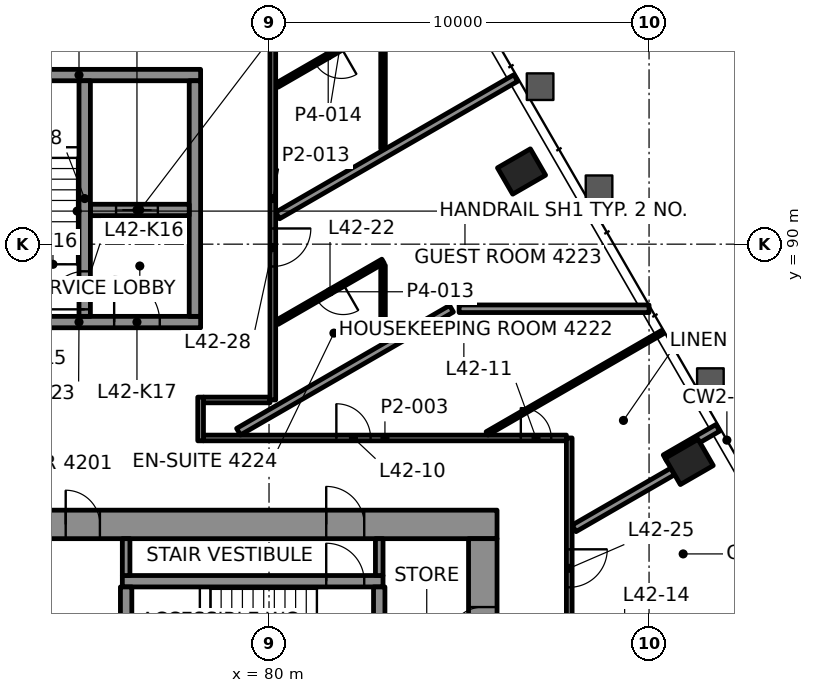
"""IFC4 building model, lengths in metres.
Left out: names, types, materials, properties, quantities, classifications, styles, units other than length and angle.
Written with IfcOpenShell. Run it as: python <this file> out.ifc"""

import sys

from ifc_helpers import new_model, si_unit, direction, frame, frame_2d, origin, origin_2d, place, context, subcontext, project, spatial, rectangle, hollow_rectangle, extrude, element, fill, save


model = new_model("IFC4")
c1 = context("Model", 3, precision=1e-05, world=origin(), true_north=direction((0.0, 1.0)))
c2 = subcontext(c1, "Body", "Model", "MODEL_VIEW")
j1 = project(units=[si_unit("LENGTHUNIT", "METRE"), si_unit("PLANEANGLEUNIT", "RADIAN")], contexts=[c1])
p1 = place(None, origin())
s1 = spatial("IfcSite", under=j1, at=p1, CompositionType="ELEMENT")
p2 = place(p1, origin())
s2 = spatial("IfcBuilding", under=s1, at=p2, CompositionType="ELEMENT")
p3 = place(p2, frame((0.0, 0.0, 183.1)))
s3 = spatial("IfcBuildingStorey", under=s2, at=p3, CompositionType="ELEMENT", Elevation=183.1)
for number, where, z_axis, x_axis in (
    (1, (91.056, 84.27, -0.0), (0.0, 0.0, 1.0), (-0.5, 0.866, 0.0)),
    (2, (86.645, 91.912, -0.0), (0.0, 0.0, 1.0), (-0.5, 0.866, 0.0)),
):
    element("IfcColumn", number, at=place(p3, frame(where, z_axis=z_axis, x_axis=x_axis)), inside=s3, PredefinedType="COLUMN", context=c2, shape_type="SweptSolid", body=[
        extrude(hollow_rectangle(XDim=0.8, YDim=1.0, WallThickness=0.05, at=origin_2d()), origin(), (0.0, 0.0, 1.0), 3.9),
    ])
p4 = place(p3, frame((64.0, 82.625, 0.0), z_axis=(0.0, 0.0, 1.0), x_axis=(1.0, 0.0, 0.0)))
e3 = element("IfcWall", 3, at=p4, inside=s3, PredefinedType="SHEAR", context=c2, shape_type="SweptSolid", body=[
    extrude(rectangle(XDim=22.0, YDim=0.75, at=frame_2d((11.0, 0.0))), origin(), (0.0, 0.0, 1.0), 3.7),
])
p5 = place(p4, frame((3.695, 0.0, 0.0)))
e4 = element("IfcOpeningElement", 4, at=p5, cuts=e3, PredefinedType="OPENING", context=c2, shape_type="SweptSolid", body=[
    extrude(rectangle(XDim=1.0, YDim=2.1, at=frame_2d((0.5, 1.05))), frame((0.0, 0.385, 0.0), z_axis=(0.0, -1.0, 0.0), x_axis=(1.0, 0.0, 0.0)), (0.0, 0.0, 1.0), 0.77),
])
p6 = place(p4, frame((17.505, 0.0, 0.0)))
e5 = element("IfcOpeningElement", 5, at=p6, cuts=e3, PredefinedType="OPENING", context=c2, shape_type="SweptSolid", body=[
    extrude(rectangle(XDim=1.0, YDim=2.1, at=frame_2d((0.5, 1.05))), frame((0.0, 0.385, 0.0), z_axis=(0.0, -1.0, 0.0), x_axis=(1.0, 0.0, 0.0)), (0.0, 0.0, 1.0), 0.77),
])
p7 = place(p4, frame((10.65, 0.0, 0.0)))
e6 = element("IfcOpeningElement", 6, at=p7, cuts=e3, PredefinedType="OPENING", context=c2, shape_type="SweptSolid", body=[
    extrude(rectangle(XDim=0.9, YDim=2.1, at=frame_2d((0.45, 1.05))), frame((0.0, 0.385, 0.0), z_axis=(0.0, -1.0, 0.0), x_axis=(1.0, 0.0, 0.0)), (0.0, 0.0, 1.0), 0.77),
])
p8 = place(p3, frame((85.625, 67.75, 0.0), z_axis=(0.0, 0.0, 1.0), x_axis=(0.0, 1.0, 0.0)))
e7 = element("IfcWall", 7, at=p8, inside=s3, PredefinedType="SHEAR", context=c2, shape_type="SweptSolid", body=[
    extrude(rectangle(XDim=14.5, YDim=0.75, at=frame_2d((7.25, 0.0))), origin(), (0.0, 0.0, 1.0), 3.7),
])
p9 = place(p8, frame((4.65, 0.0, 0.0)))
e8 = element("IfcOpeningElement", 8, at=p9, cuts=e7, PredefinedType="OPENING", context=c2, shape_type="SweptSolid", body=[
    extrude(rectangle(XDim=1.8, YDim=2.1, at=frame_2d((0.9, 1.05))), frame((0.0, 0.385, 0.0), z_axis=(0.0, -1.0, 0.0), x_axis=(1.0, 0.0, 0.0)), (0.0, 0.0, 1.0), 0.77),
])
p10 = place(p8, frame((11.8, 0.0, 0.0)))
e9 = element("IfcOpeningElement", 9, at=p10, cuts=e7, PredefinedType="OPENING", context=c2, shape_type="SweptSolid", body=[
    extrude(rectangle(XDim=0.9, YDim=2.1, at=frame_2d((0.45, 1.05))), frame((0.0, 0.385, 0.0), z_axis=(0.0, -1.0, 0.0), x_axis=(1.0, 0.0, 0.0)), (0.0, 0.0, 1.0), 0.77),
])
p11 = place(p3, frame((76.14, 81.13, 0.0), z_axis=(0.0, 0.0, 1.0), x_axis=(1.0, 0.0, 0.0)))
e10 = element("IfcWall", 10, at=p11, inside=s3, PredefinedType="SHEAR", context=c2, shape_type="SweptSolid", body=[
    extrude(rectangle(XDim=6.86, YDim=0.3, at=frame_2d((3.43, 0.0))), origin(), (0.0, 0.0, 1.0), 3.7),
])
p12 = place(p11, frame((5.365, 0.0, 0.0)))
e11 = element("IfcOpeningElement", 11, at=p12, cuts=e10, PredefinedType="OPENING", context=c2, shape_type="SweptSolid", body=[
    extrude(rectangle(XDim=1.0, YDim=2.1, at=frame_2d((0.5, 1.05))), frame((0.0, 0.16, 0.0), z_axis=(0.0, -1.0, 0.0), x_axis=(1.0, 0.0, 0.0)), (0.0, 0.0, 1.0), 0.32),
])
for number, where, z_axis, x_axis in (
    (12, (76.24, 77.9, 0.0), (0.0, 0.0, 1.0), (0.0, 1.0, 0.0)),
    (13, (82.9, 77.9, 0.0), (0.0, 0.0, 1.0), (0.0, 1.0, 0.0)),
):
    element("IfcWall", number, at=place(p3, frame(where, z_axis=z_axis, x_axis=x_axis)), inside=s3, PredefinedType="SHEAR", context=c2, shape_type="SweptSolid", body=[
        extrude(rectangle(XDim=3.08, YDim=0.3, at=frame_2d((1.54, 0.0))), origin(), (0.0, 0.0, 1.0), 3.7),
    ])
p13 = place(p3, frame((71.8, 87.95, 0.0), z_axis=(0.0, 0.0, 1.0), x_axis=(1.0, 0.0, 0.0)))
e14 = element("IfcWall", 14, at=p13, inside=s3, PredefinedType="SHEAR", context=c2, shape_type="SweptSolid", body=[
    extrude(rectangle(XDim=6.4, YDim=0.3, at=frame_2d((3.2, 0.0))), origin(), (0.0, 0.0, 1.0), 3.7),
])
p14 = place(p13, frame((1.325, 0.0, 0.0)))
e15 = element("IfcOpeningElement", 15, at=p14, cuts=e14, PredefinedType="OPENING", context=c2, shape_type="SweptSolid", body=[
    extrude(rectangle(XDim=1.0, YDim=2.1, at=frame_2d((0.5, 1.05))), frame((0.0, 0.16, 0.0), z_axis=(0.0, -1.0, 0.0), x_axis=(1.0, 0.0, 0.0)), (0.0, 0.0, 1.0), 0.32),
])
p15 = place(p13, frame((4.125, 0.0, 0.0)))
e16 = element("IfcOpeningElement", 16, at=p15, cuts=e14, PredefinedType="OPENING", context=c2, shape_type="SweptSolid", body=[
    extrude(rectangle(XDim=1.2, YDim=2.1, at=frame_2d((0.6, 1.05))), frame((0.0, 0.16, 0.0), z_axis=(0.0, -1.0, 0.0), x_axis=(1.0, 0.0, 0.0)), (0.0, 0.0, 1.0), 0.32),
])
p16 = place(p3, frame((71.8, 94.45, 0.0), z_axis=(0.0, 0.0, 1.0), x_axis=(1.0, 0.0, 0.0)))
e17 = element("IfcWall", 17, at=p16, inside=s3, PredefinedType="SHEAR", context=c2, shape_type="SweptSolid", body=[
    extrude(rectangle(XDim=6.4, YDim=0.3, at=frame_2d((3.2, 0.0))), origin(), (0.0, 0.0, 1.0), 3.7),
])
p17 = place(p3, frame((78.05, 88.1, 0.0), z_axis=(0.0, 0.0, 1.0), x_axis=(0.0, 1.0, 0.0)))
e18 = element("IfcWall", 18, at=p17, inside=s3, PredefinedType="SHEAR", context=c2, shape_type="SweptSolid", body=[
    extrude(rectangle(XDim=6.2, YDim=0.3, at=frame_2d((3.1, 0.0))), origin(), (0.0, 0.0, 1.0), 3.7),
])
p18 = place(p3, frame((75.3, 90.9, 0.0), z_axis=(0.0, 0.0, 1.0), x_axis=(1.0, 0.0, 0.0)))
e19 = element("IfcWall", 19, at=p18, inside=s3, PredefinedType="SHEAR", context=c2, shape_type="SweptSolid", body=[
    extrude(rectangle(XDim=2.6, YDim=0.3, at=frame_2d((1.3, 0.0))), origin(), (0.0, 0.0, 1.0), 3.7),
])
p19 = place(p18, frame((0.675, 0.0, 0.0)))
e20 = element("IfcOpeningElement", 20, at=p19, cuts=e19, PredefinedType="OPENING", context=c2, shape_type="SweptSolid", body=[
    extrude(rectangle(XDim=1.1, YDim=2.1, at=frame_2d((0.55, 1.05))), frame((0.0, 0.16, 0.0), z_axis=(0.0, -1.0, 0.0), x_axis=(1.0, 0.0, 0.0)), (0.0, 0.0, 1.0), 0.32),
])
p20 = place(p3, frame((75.15, 88.1, 0.0), z_axis=(0.0, 0.0, 1.0), x_axis=(0.0, 1.0, 0.0)))
e21 = element("IfcWall", 21, at=p20, inside=s3, PredefinedType="SHEAR", context=c2, shape_type="SweptSolid", body=[
    extrude(rectangle(XDim=6.2, YDim=0.3, at=frame_2d((3.1, 0.0))), origin(), (0.0, 0.0, 1.0), 3.7),
])
p21 = place(p20, frame((0.185, 0.0, 0.0)))
e22 = element("IfcOpeningElement", 22, at=p21, cuts=e21, PredefinedType="OPENING", context=c2, shape_type="SweptSolid", body=[
    extrude(rectangle(XDim=1.0, YDim=2.1, at=frame_2d((0.5, 1.05))), frame((0.0, 0.16, 0.0), z_axis=(0.0, -1.0, 0.0), x_axis=(1.0, 0.0, 0.0)), (0.0, 0.0, 1.0), 0.32),
])
p22 = place(p3, frame((78.275, 84.9, 0.0), z_axis=(0.0, 0.0, 1.0), x_axis=(1.0, 0.0, 0.0)))
e23 = element("IfcWall", 23, at=p22, inside=s3, PredefinedType="PARTITIONING", context=c2, shape_type="SweptSolid", body=[
    extrude(rectangle(XDim=9.55, YDim=0.15, at=frame_2d((4.775, 0.0))), origin(), (0.0, 0.0, 1.0), 3.1),
])
p23 = place(p22, frame((3.497, 0.0, 0.0)))
e24 = element("IfcOpeningElement", 24, at=p23, cuts=e23, PredefinedType="OPENING", context=c2, shape_type="SweptSolid", body=[
    extrude(rectangle(XDim=0.9, YDim=2.1, at=frame_2d((0.45, 1.05))), frame((0.0, 0.085, 0.0), z_axis=(0.0, -1.0, 0.0), x_axis=(1.0, 0.0, 0.0)), (0.0, 0.0, 1.0), 0.17),
])
p24 = place(p22, frame((8.351, 0.0, 0.0)))
e25 = element("IfcOpeningElement", 25, at=p24, cuts=e23, PredefinedType="OPENING", context=c2, shape_type="SweptSolid", body=[
    extrude(rectangle(XDim=0.8, YDim=2.1, at=frame_2d((0.4, 1.05))), frame((0.0, 0.085, 0.0), z_axis=(0.0, -1.0, 0.0), x_axis=(1.0, 0.0, 0.0)), (0.0, 0.0, 1.0), 0.17),
])
p25 = place(p3, frame((78.275, 85.9, 0.0), z_axis=(0.0, 0.0, 1.0), x_axis=(1.0, 0.0, 0.0)))
e26 = element("IfcWall", 26, at=p25, inside=s3, PredefinedType="PARTITIONING", context=c2, shape_type="SweptSolid", body=[
    extrude(rectangle(XDim=1.75, YDim=0.15, at=frame_2d((0.875, 0.0))), origin(), (0.0, 0.0, 1.0), 3.1),
])
p26 = place(p3, frame((83.06, 87.8, 0.0), z_axis=(0.0, 0.0, 1.0), x_axis=(1.0, 0.0, 0.0)))
e27 = element("IfcWall", 27, at=p26, inside=s3, PredefinedType="PARTITIONING", context=c2, shape_type="SweptSolid", body=[
    extrude(rectangle(XDim=0.564, YDim=0.12, at=frame_2d((0.282, 0.0))), origin(), (0.0, 0.0, 1.0), 3.1),
])
p27 = place(p3, frame((85.002, 88.3, 0.0), z_axis=(0.0, 0.0, 1.0), x_axis=(1.0, 0.0, 0.0)))
e28 = element("IfcWall", 28, at=p27, inside=s3, PredefinedType="PARTITIONING", context=c2, shape_type="SweptSolid", body=[
    extrude(rectangle(XDim=4.998, YDim=0.2, at=frame_2d((2.499, 0.0))), origin(), (0.0, 0.0, 1.0), 3.022),
])
p28 = place(p3, frame((88.027, 82.521, 0.0), z_axis=(0.0, 0.0, 1.0), x_axis=(0.866029639064, 0.499992664208, 0.0)))
e29 = element("IfcWall", 29, at=p28, inside=s3, PredefinedType="PARTITIONING", context=c2, shape_type="SweptSolid", body=[
    extrude(rectangle(XDim=2.998, YDim=0.2, at=frame_2d((1.499, 0.0))), origin(), (0.0, 0.0, 1.0), 3.1),
])
p29 = place(p3, frame((90.423, 84.367, 0.0), z_axis=(0.0, 0.0, 1.0), x_axis=(0.865989903783, 0.500061482766, 0.0)))
e30 = element("IfcWall", 30, at=p29, inside=s3, PredefinedType="PARTITIONING", context=c2, shape_type="SweptSolid", body=[
    extrude(rectangle(XDim=1.6, YDim=0.2, at=frame_2d((0.8, 0.0))), origin(), (0.0, 0.0, 1.0), 3.022),
])
p30 = place(p3, frame((85.737, 85.02, 0.0), z_axis=(0.0, 0.0, 1.0), x_axis=(0.8660338432, 0.499985382219, 0.0)))
e31 = element("IfcWall", 31, at=p30, inside=s3, PredefinedType="PARTITIONING", context=c2, shape_type="SweptSolid", body=[
    extrude(rectangle(XDim=5.332, YDim=0.1, at=frame_2d((2.666, 0.0))), origin(), (0.0, 0.0, 1.0), 3.022),
])
p31 = place(p3, frame((79.197, 85.065, 0.0), z_axis=(0.0, 0.0, 1.0), x_axis=(0.86602410867, 0.500002243197, 0.0)))
e32 = element("IfcWall", 32, at=p31, inside=s3, PredefinedType="PARTITIONING", context=c2, shape_type="SweptSolid", body=[
    extrude(rectangle(XDim=6.471, YDim=0.2, at=frame_2d((3.235, 0.0))), origin(), (0.0, 0.0, 1.0), 3.1),
])
p32 = place(p3, frame((83.0, 89.553, 0.0), z_axis=(0.0, 0.0, 1.0), x_axis=(-0.86604299788, -0.499969524894, 0.0)))
e33 = element("IfcWall", 33, at=p32, inside=s3, PredefinedType="PARTITIONING", context=c2, shape_type="SweptSolid", body=[
    extrude(rectangle(XDim=3.222, YDim=0.12, at=frame_2d((1.611, 0.0))), origin(), (0.0, 0.0, 1.0), 3.1),
])
p33 = place(p32, frame((1.211, 0.0, 0.0)))
e34 = element("IfcOpeningElement", 34, at=p33, cuts=e33, PredefinedType="OPENING", context=c2, shape_type="SweptSolid", body=[
    extrude(rectangle(XDim=0.8, YDim=2.1, at=frame_2d((0.4, 1.05))), frame((0.0, 0.07, 0.0), z_axis=(0.0, -1.0, 0.0), x_axis=(1.0, 0.0, 0.0)), (0.0, 0.0, 1.0), 0.14),
])
p34 = place(p3, frame((80.227, 90.754, 0.0), z_axis=(0.0, 0.0, 1.0), x_axis=(0.866019288795, 0.500010591322, 0.0)))
e35 = element("IfcWall", 35, at=p34, inside=s3, PredefinedType="PARTITIONING", context=c2, shape_type="SweptSolid", body=[
    extrude(rectangle(XDim=7.237, YDim=0.2, at=frame_2d((3.618, 0.0))), origin(), (0.0, 0.0, 1.0), 3.022),
])
p35 = place(p3, frame((82.905, 95.739, 0.0), z_axis=(0.0, 0.0, 1.0), x_axis=(-0.866028856698, -0.499994019331, 0.0)))
e36 = element("IfcWall", 36, at=p35, inside=s3, PredefinedType="PARTITIONING", context=c2, shape_type="SweptSolid", body=[
    extrude(rectangle(XDim=3.113, YDim=0.12, at=frame_2d((1.556, 0.0))), origin(), (0.0, 0.0, 1.0), 3.1),
])
p36 = place(p35, frame((1.156, 0.0, 0.0)))
e37 = element("IfcOpeningElement", 37, at=p36, cuts=e36, PredefinedType="OPENING", context=c2, shape_type="SweptSolid", body=[
    extrude(rectangle(XDim=0.8, YDim=2.1, at=frame_2d((0.4, 1.05))), frame((0.0, 0.07, 0.0), z_axis=(0.0, -1.0, 0.0), x_axis=(1.0, 0.0, 0.0)), (0.0, 0.0, 1.0), 0.14),
])
p37 = place(p3, frame((87.9, 84.9, 0.0), z_axis=(0.0, 0.0, 1.0), x_axis=(0.0, -1.0, 0.0)))
e38 = element("IfcWall", 38, at=p37, inside=s3, PredefinedType="PARTITIONING", context=c2, shape_type="SweptSolid", body=[
    extrude(rectangle(XDim=16.308, YDim=0.15, at=frame_2d((8.154, 0.0))), origin(), (0.0, 0.0, 1.0), 3.1),
])
p38 = place(p37, frame((2.93, 0.0, 0.0)))
e39 = element("IfcOpeningElement", 39, at=p38, cuts=e38, PredefinedType="OPENING", context=c2, shape_type="SweptSolid", body=[
    extrude(rectangle(XDim=1.0, YDim=2.1, at=frame_2d((0.5, 1.05))), frame((0.0, 0.085, 0.0), z_axis=(0.0, -1.0, 0.0), x_axis=(1.0, 0.0, 0.0)), (0.0, 0.0, 1.0), 0.17),
])
p39 = place(p37, frame((12.5, 0.0, 0.0)))
e40 = element("IfcOpeningElement", 40, at=p39, cuts=e38, PredefinedType="OPENING", context=c2, shape_type="SweptSolid", body=[
    extrude(rectangle(XDim=1.2, YDim=2.1, at=frame_2d((0.6, 1.05))), frame((0.0, 0.085, 0.0), z_axis=(0.0, -1.0, 0.0), x_axis=(1.0, 0.0, 0.0)), (0.0, 0.0, 1.0), 0.17),
])
p40 = place(p3, frame((83.0, 87.8, 0.0), z_axis=(0.0, 0.0, 1.0), x_axis=(0.0, 1.0, 0.0)))
e41 = element("IfcWall", 41, at=p40, inside=s3, PredefinedType="PARTITIONING", context=c2, shape_type="SweptSolid", body=[
    extrude(rectangle(XDim=1.644, YDim=0.12, at=frame_2d((0.822, 0.0))), origin(), (0.0, 0.0, 1.0), 3.1),
])
p41 = place(p3, frame((83.0, 92.51, 0.0), z_axis=(0.0, 0.0, 1.0), x_axis=(0.0, 1.0, 0.0)))
e42 = element("IfcWall", 42, at=p41, inside=s3, PredefinedType="PARTITIONING", context=c2, shape_type="SweptSolid", body=[
    extrude(rectangle(XDim=3.283, YDim=0.12, at=frame_2d((1.642, 0.0))), origin(), (0.0, 0.0, 1.0), 3.1),
])
p42 = place(p3, frame((80.1, 96.5, 0.0), z_axis=(0.0, 0.0, 1.0), x_axis=(0.0, -1.0, 0.0)))
e43 = element("IfcWall", 43, at=p42, inside=s3, PredefinedType="PARTITIONING", context=c2, shape_type="SweptSolid", body=[
    extrude(rectangle(XDim=10.6, YDim=0.15, at=frame_2d((5.3, 0.0))), origin(), (0.0, 0.0, 1.0), 3.022),
])
p43 = place(p42, frame((0.377, 0.0, 0.0)))
e44 = element("IfcOpeningElement", 44, at=p43, cuts=e43, PredefinedType="OPENING", context=c2, shape_type="SweptSolid", body=[
    extrude(rectangle(XDim=1.0, YDim=2.1, at=frame_2d((0.5, 1.05))), frame((0.0, 0.085, 0.0), z_axis=(0.0, -1.0, 0.0), x_axis=(1.0, 0.0, 0.0)), (0.0, 0.0, 1.0), 0.17),
])
p44 = place(p42, frame((6.087, 0.0, 0.0)))
e45 = element("IfcOpeningElement", 45, at=p44, cuts=e43, PredefinedType="OPENING", context=c2, shape_type="SweptSolid", body=[
    extrude(rectangle(XDim=1.0, YDim=2.1, at=frame_2d((0.5, 1.05))), frame((0.0, 0.085, 0.0), z_axis=(0.0, -1.0, 0.0), x_axis=(1.0, 0.0, 0.0)), (0.0, 0.0, 1.0), 0.17),
])
p45 = place(p3, frame((78.2, 84.825, 0.0), z_axis=(0.0, 0.0, 1.0), x_axis=(0.0, 1.0, 0.0)))
e46 = element("IfcWall", 46, at=p45, inside=s3, PredefinedType="PARTITIONING", context=c2, shape_type="SweptSolid", body=[
    extrude(rectangle(XDim=1.15, YDim=0.15, at=frame_2d((0.575, 0.0))), origin(), (0.0, 0.0, 1.0), 3.1),
])
for number, where, z_axis, x_axis in (
    (47, (76.24, 81.28, 0.0), (0.0, 0.0, 1.0), (0.0, 1.0, 0.0)),
    (48, (82.9, 81.28, 0.0), (0.0, 0.0, 1.0), (0.0, 1.0, 0.0)),
):
    element("IfcWall", number, at=place(p3, frame(where, z_axis=z_axis, x_axis=x_axis)), inside=s3, PredefinedType="PARTITIONING", context=c2, shape_type="SweptSolid", body=[
        extrude(rectangle(XDim=0.97, YDim=0.2, at=frame_2d((0.485, 0.0))), origin(), (0.0, 0.0, 1.0), 3.7),
    ])
p46 = place(p23, origin())
e49 = element("IfcDoor", 49, at=p46, inside=s3, OperationType="SINGLE_SWING_LEFT", PredefinedType="DOOR", context=c2, shape_type="SweptSolid", body=[
    extrude(rectangle(XDim=0.9, YDim=2.1, at=frame_2d((0.45, 1.05))), frame((0.0, 0.025, 0.0), z_axis=(0.0, -1.0, 0.0), x_axis=(1.0, 0.0, 0.0)), (0.0, 0.0, 1.0), 0.05),
])
fill(e24, e49)
p47 = place(p24, origin())
e50 = element("IfcDoor", 50, at=p47, inside=s3, OperationType="SINGLE_SWING_RIGHT", PredefinedType="DOOR", context=c2, shape_type="SweptSolid", body=[
    extrude(rectangle(XDim=0.8, YDim=2.1, at=frame_2d((0.4, 1.05))), frame((0.0, 0.025, 0.0), z_axis=(0.0, -1.0, 0.0), x_axis=(1.0, 0.0, 0.0)), (0.0, 0.0, 1.0), 0.05),
])
fill(e25, e50)
p48 = place(p33, origin())
e51 = element("IfcDoor", 51, at=p48, inside=s3, OperationType="SINGLE_SWING_RIGHT", PredefinedType="DOOR", context=c2, shape_type="SweptSolid", body=[
    extrude(rectangle(XDim=0.8, YDim=2.1, at=frame_2d((0.4, 1.05))), frame((0.0, 0.025, 0.0), z_axis=(0.0, -1.0, 0.0), x_axis=(1.0, 0.0, 0.0)), (0.0, 0.0, 1.0), 0.05),
])
fill(e34, e51)
p49 = place(p36, origin())
e52 = element("IfcDoor", 52, at=p49, inside=s3, OperationType="SINGLE_SWING_RIGHT", PredefinedType="DOOR", context=c2, shape_type="SweptSolid", body=[
    extrude(rectangle(XDim=0.8, YDim=2.1, at=frame_2d((0.4, 1.05))), frame((0.0, 0.025, 0.0), z_axis=(0.0, -1.0, 0.0), x_axis=(1.0, 0.0, 0.0)), (0.0, 0.0, 1.0), 0.05),
])
fill(e37, e52)
p50 = place(p38, origin())
e53 = element("IfcDoor", 53, at=p50, inside=s3, OperationType="SINGLE_SWING_LEFT", PredefinedType="DOOR", context=c2, shape_type="SweptSolid", body=[
    extrude(rectangle(XDim=1.0, YDim=2.1, at=frame_2d((0.5, 1.05))), frame((0.0, 0.025, 0.0), z_axis=(0.0, -1.0, 0.0), x_axis=(1.0, 0.0, 0.0)), (0.0, 0.0, 1.0), 0.05),
])
fill(e39, e53)
p51 = place(p44, origin())
e54 = element("IfcDoor", 54, at=p51, inside=s3, OperationType="SINGLE_SWING_LEFT", PredefinedType="DOOR", context=c2, shape_type="SweptSolid", body=[
    extrude(rectangle(XDim=1.0, YDim=2.1, at=frame_2d((0.5, 1.05))), frame((0.0, 0.025, 0.0), z_axis=(0.0, -1.0, 0.0), x_axis=(1.0, 0.0, 0.0)), (0.0, 0.0, 1.0), 0.05),
])
fill(e45, e54)
p52 = place(p19, origin())
e55 = element("IfcDoor", 55, at=p52, inside=s3, OperationType="DOUBLE_DOOR_SLIDING", PredefinedType="DOOR", context=c2, shape_type="SweptSolid", body=[
    extrude(rectangle(XDim=1.1, YDim=2.1, at=frame_2d((0.55, 1.05))), frame((0.0, 0.025, 0.0), z_axis=(0.0, -1.0, 0.0), x_axis=(1.0, 0.0, 0.0)), (0.0, 0.0, 1.0), 0.05),
])
fill(e20, e55)
p53 = place(p12, origin())
e56 = element("IfcDoor", 56, at=p53, inside=s3, OperationType="SINGLE_SWING_RIGHT", PredefinedType="DOOR", context=c2, shape_type="SweptSolid", body=[
    extrude(rectangle(XDim=1.0, YDim=2.1, at=frame_2d((0.5, 1.05))), frame((0.0, 0.025, 0.0), z_axis=(0.0, -1.0, 0.0), x_axis=(1.0, 0.0, 0.0)), (0.0, 0.0, 1.0), 0.05),
])
fill(e11, e56)
p54 = place(p6, origin())
e57 = element("IfcDoor", 57, at=p54, inside=s3, OperationType="SINGLE_SWING_LEFT", PredefinedType="DOOR", context=c2, shape_type="SweptSolid", body=[
    extrude(rectangle(XDim=1.0, YDim=2.1, at=frame_2d((0.5, 1.05))), frame((0.0, 0.095, 0.0), z_axis=(0.0, -1.0, 0.0), x_axis=(1.0, 0.0, 0.0)), (0.0, 0.0, 1.0), 0.19),
])
fill(e5, e57)
p55 = place(p21, origin())
e58 = element("IfcDoor", 58, at=p55, inside=s3, OperationType="SINGLE_SWING_LEFT", PredefinedType="DOOR", context=c2, shape_type="SweptSolid", body=[
    extrude(rectangle(XDim=1.0, YDim=2.1, at=frame_2d((0.5, 1.05))), frame((0.0, 0.025, 0.0), z_axis=(0.0, -1.0, 0.0), x_axis=(1.0, 0.0, 0.0)), (0.0, 0.0, 1.0), 0.05),
])
fill(e22, e58)
p56 = place(p15, origin())
e59 = element("IfcDoor", 59, at=p56, inside=s3, OperationType="SINGLE_SWING_RIGHT", PredefinedType="DOOR", context=c2, shape_type="SweptSolid", body=[
    extrude(rectangle(XDim=1.2, YDim=2.1, at=frame_2d((0.6, 1.05))), frame((0.0, 0.025, 0.0), z_axis=(0.0, -1.0, 0.0), x_axis=(1.0, 0.0, 0.0)), (0.0, 0.0, 1.0), 0.05),
])
fill(e16, e59)
p57 = place(p7, origin())
e60 = element("IfcDoor", 60, at=p57, inside=s3, OperationType="SINGLE_SWING_LEFT", PredefinedType="DOOR", context=c2, shape_type="SweptSolid", body=[
    extrude(rectangle(XDim=0.9, YDim=2.1, at=frame_2d((0.45, 1.05))), frame((0.0, 0.095, 0.0), z_axis=(0.0, -1.0, 0.0), x_axis=(1.0, 0.0, 0.0)), (0.0, 0.0, 1.0), 0.19),
])
fill(e6, e60)
p58 = place(p10, origin())
e61 = element("IfcDoor", 61, at=p58, inside=s3, OperationType="SINGLE_SWING_RIGHT", PredefinedType="DOOR", context=c2, shape_type="SweptSolid", body=[
    extrude(rectangle(XDim=0.9, YDim=2.1, at=frame_2d((0.45, 1.05))), frame((0.0, 0.095, 0.0), z_axis=(0.0, -1.0, 0.0), x_axis=(1.0, 0.0, 0.0)), (0.0, 0.0, 1.0), 0.19),
])
fill(e9, e61)
save(model, sys.argv[1])
